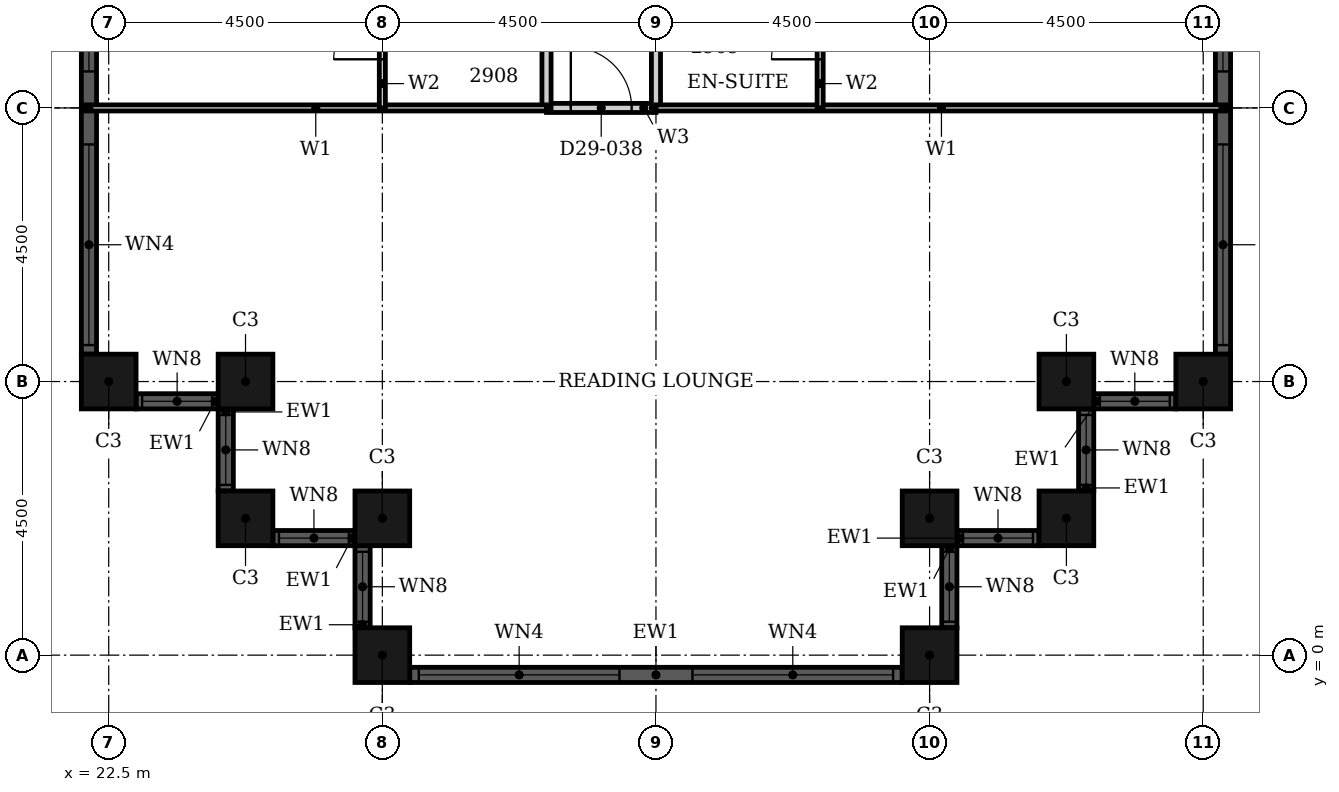
"""IFC4 building model, lengths in metres.
Left out: names, types, materials, properties, quantities, classifications, styles, units other than length and angle.
Written with IfcOpenShell. Run it as: python <this file> out.ifc"""

import sys

from ifc_helpers import new_model, si_unit, direction, frame, frame_2d, origin, origin_2d, place, context, subcontext, project, spatial, rectangle, hollow_rectangle, extrude, element, fill, save


model = new_model("IFC4")
c1 = context("Model", 3, precision=1e-05, world=origin(), true_north=direction((0.0, 1.0)))
c2 = subcontext(c1, "Body", "Model", "MODEL_VIEW")
j1 = project(units=[si_unit("LENGTHUNIT", "METRE"), si_unit("PLANEANGLEUNIT", "RADIAN")], contexts=[c1])
p1 = place(None, origin())
s1 = spatial("IfcSite", under=j1, at=p1, CompositionType="ELEMENT")
p2 = place(p1, origin())
s2 = spatial("IfcBuilding", under=s1, at=p2, CompositionType="ELEMENT")
p3 = place(p2, frame((0.0, 0.0, 118.8)))
s3 = spatial("IfcBuildingStorey", under=s2, at=p3, CompositionType="ELEMENT", Elevation=118.8)
for number, where, z_axis, x_axis in (
    (1, (22.5, 4.5, 0.0), (0.0, 0.0, 1.0), (1.0, 0.0, 0.0)),
    (2, (24.75, 4.5, 0.0), (0.0, 0.0, 1.0), (1.0, 0.0, 0.0)),
    (3, (24.75, 2.25, 0.0), (0.0, 0.0, 1.0), (1.0, 0.0, 0.0)),
    (4, (27.0, 2.25, 0.0), (0.0, 0.0, 1.0), (1.0, 0.0, 0.0)),
    (5, (27.0, 0.0, 0.0), (0.0, 0.0, 1.0), (1.0, 0.0, 0.0)),
    (6, (36.0, 0.0, 0.0), (0.0, 0.0, 1.0), (1.0, 0.0, 0.0)),
    (7, (36.0, 2.25, 0.0), (0.0, 0.0, 1.0), (1.0, 0.0, 0.0)),
    (8, (38.25, 2.25, 0.0), (0.0, 0.0, 1.0), (1.0, 0.0, 0.0)),
    (9, (38.25, 4.5, 0.0), (0.0, 0.0, 1.0), (1.0, 0.0, 0.0)),
    (10, (40.5, 4.5, 0.0), (0.0, 0.0, 1.0), (1.0, 0.0, 0.0)),
):
    element("IfcColumn", number, at=place(p3, frame(where, z_axis=z_axis, x_axis=x_axis)), inside=s3, PredefinedType="COLUMN", context=c2, shape_type="SweptSolid", body=[
        extrude(hollow_rectangle(XDim=0.9, YDim=0.9, WallThickness=0.028, at=origin_2d()), origin(), (0.0, 0.0, 1.0), 3.6),
    ])
p4 = place(p3, frame((22.95, 4.175, 0.0), z_axis=(0.0, 0.0, 1.0), x_axis=(1.0, 0.0, 0.0)))
e11 = element("IfcWall", 11, at=p4, inside=s3, PredefinedType="SOLIDWALL", context=c2, shape_type="SweptSolid", body=[
    extrude(rectangle(XDim=1.35, YDim=0.25, at=frame_2d((0.675, 0.0))), origin(), (0.0, 0.0, 1.0), 3.6),
])
p5 = place(p4, frame((0.1, 0.0, 0.9)))
e12 = element("IfcOpeningElement", 12, at=p5, cuts=e11, PredefinedType="OPENING", context=c2, shape_type="SweptSolid", body=[
    extrude(rectangle(XDim=1.15, YDim=2.08, at=frame_2d((0.575, 1.04))), frame((0.0, 0.135, 0.0), z_axis=(0.0, -1.0, 0.0), x_axis=(1.0, 0.0, 0.0)), (0.0, 0.0, 1.0), 0.27),
])
p6 = place(p3, frame((24.425, 4.05, 0.0), z_axis=(0.0, 0.0, 1.0), x_axis=(0.0, -1.0, 0.0)))
e13 = element("IfcWall", 13, at=p6, inside=s3, PredefinedType="SOLIDWALL", context=c2, shape_type="SweptSolid", body=[
    extrude(rectangle(XDim=1.35, YDim=0.25, at=frame_2d((0.675, 0.0))), origin(), (0.0, 0.0, 1.0), 3.6),
])
p7 = place(p6, frame((0.1, 0.0, 0.9)))
e14 = element("IfcOpeningElement", 14, at=p7, cuts=e13, PredefinedType="OPENING", context=c2, shape_type="SweptSolid", body=[
    extrude(rectangle(XDim=1.15, YDim=2.08, at=frame_2d((0.575, 1.04))), frame((0.0, 0.135, 0.0), z_axis=(0.0, -1.0, 0.0), x_axis=(1.0, 0.0, 0.0)), (0.0, 0.0, 1.0), 0.27),
])
p8 = place(p3, frame((25.2, 1.925, 0.0), z_axis=(0.0, 0.0, 1.0), x_axis=(1.0, 0.0, 0.0)))
e15 = element("IfcWall", 15, at=p8, inside=s3, PredefinedType="SOLIDWALL", context=c2, shape_type="SweptSolid", body=[
    extrude(rectangle(XDim=1.35, YDim=0.25, at=frame_2d((0.675, 0.0))), origin(), (0.0, 0.0, 1.0), 3.6),
])
p9 = place(p8, frame((0.1, 0.0, 0.9)))
e16 = element("IfcOpeningElement", 16, at=p9, cuts=e15, PredefinedType="OPENING", context=c2, shape_type="SweptSolid", body=[
    extrude(rectangle(XDim=1.15, YDim=2.08, at=frame_2d((0.575, 1.04))), frame((0.0, 0.135, 0.0), z_axis=(0.0, -1.0, 0.0), x_axis=(1.0, 0.0, 0.0)), (0.0, 0.0, 1.0), 0.27),
])
p10 = place(p3, frame((26.675, 1.8, 0.0), z_axis=(0.0, 0.0, 1.0), x_axis=(0.0, -1.0, 0.0)))
e17 = element("IfcWall", 17, at=p10, inside=s3, PredefinedType="SOLIDWALL", context=c2, shape_type="SweptSolid", body=[
    extrude(rectangle(XDim=1.35, YDim=0.25, at=frame_2d((0.675, 0.0))), origin(), (0.0, 0.0, 1.0), 3.6),
])
p11 = place(p10, frame((0.1, 0.0, 0.9)))
e18 = element("IfcOpeningElement", 18, at=p11, cuts=e17, PredefinedType="OPENING", context=c2, shape_type="SweptSolid", body=[
    extrude(rectangle(XDim=1.15, YDim=2.08, at=frame_2d((0.575, 1.04))), frame((0.0, 0.135, 0.0), z_axis=(0.0, -1.0, 0.0), x_axis=(1.0, 0.0, 0.0)), (0.0, 0.0, 1.0), 0.27),
])
p12 = place(p3, frame((27.45, -0.325, 0.0), z_axis=(0.0, 0.0, 1.0), x_axis=(1.0, 0.0, 0.0)))
e19 = element("IfcWall", 19, at=p12, inside=s3, PredefinedType="SOLIDWALL", context=c2, shape_type="SweptSolid", body=[
    extrude(rectangle(XDim=8.1, YDim=0.25, at=frame_2d((4.05, 0.0))), origin(), (0.0, 0.0, 1.0), 3.6),
])
p13 = place(p12, frame((0.15, 0.0, 0.9)))
e20 = element("IfcOpeningElement", 20, at=p13, cuts=e19, PredefinedType="OPENING", context=c2, shape_type="SweptSolid", body=[
    extrude(rectangle(XDim=3.3, YDim=2.08, at=frame_2d((1.65, 1.04))), frame((0.0, 0.135, 0.0), z_axis=(0.0, -1.0, 0.0), x_axis=(1.0, 0.0, 0.0)), (0.0, 0.0, 1.0), 0.27),
])
p14 = place(p12, frame((4.65, 0.0, 0.9)))
e21 = element("IfcOpeningElement", 21, at=p14, cuts=e19, PredefinedType="OPENING", context=c2, shape_type="SweptSolid", body=[
    extrude(rectangle(XDim=3.3, YDim=2.08, at=frame_2d((1.65, 1.04))), frame((0.0, 0.135, 0.0), z_axis=(0.0, -1.0, 0.0), x_axis=(1.0, 0.0, 0.0)), (0.0, 0.0, 1.0), 0.27),
])
p15 = place(p3, frame((36.325, 0.45, 0.0), z_axis=(0.0, 0.0, 1.0), x_axis=(0.0, 1.0, 0.0)))
e22 = element("IfcWall", 22, at=p15, inside=s3, PredefinedType="SOLIDWALL", context=c2, shape_type="SweptSolid", body=[
    extrude(rectangle(XDim=1.35, YDim=0.25, at=frame_2d((0.675, 0.0))), origin(), (0.0, 0.0, 1.0), 3.6),
])
p16 = place(p15, frame((0.1, 0.0, 0.9)))
e23 = element("IfcOpeningElement", 23, at=p16, cuts=e22, PredefinedType="OPENING", context=c2, shape_type="SweptSolid", body=[
    extrude(rectangle(XDim=1.15, YDim=2.08, at=frame_2d((0.575, 1.04))), frame((0.0, 0.135, 0.0), z_axis=(0.0, -1.0, 0.0), x_axis=(1.0, 0.0, 0.0)), (0.0, 0.0, 1.0), 0.27),
])
p17 = place(p3, frame((36.45, 1.925, 0.0), z_axis=(0.0, 0.0, 1.0), x_axis=(1.0, 0.0, 0.0)))
e24 = element("IfcWall", 24, at=p17, inside=s3, PredefinedType="SOLIDWALL", context=c2, shape_type="SweptSolid", body=[
    extrude(rectangle(XDim=1.35, YDim=0.25, at=frame_2d((0.675, 0.0))), origin(), (0.0, 0.0, 1.0), 3.6),
])
p18 = place(p17, frame((0.1, 0.0, 0.9)))
e25 = element("IfcOpeningElement", 25, at=p18, cuts=e24, PredefinedType="OPENING", context=c2, shape_type="SweptSolid", body=[
    extrude(rectangle(XDim=1.15, YDim=2.08, at=frame_2d((0.575, 1.04))), frame((0.0, 0.135, 0.0), z_axis=(0.0, -1.0, 0.0), x_axis=(1.0, 0.0, 0.0)), (0.0, 0.0, 1.0), 0.27),
])
p19 = place(p3, frame((38.575, 2.7, 0.0), z_axis=(0.0, 0.0, 1.0), x_axis=(0.0, 1.0, 0.0)))
e26 = element("IfcWall", 26, at=p19, inside=s3, PredefinedType="SOLIDWALL", context=c2, shape_type="SweptSolid", body=[
    extrude(rectangle(XDim=1.35, YDim=0.25, at=frame_2d((0.675, 0.0))), origin(), (0.0, 0.0, 1.0), 3.6),
])
p20 = place(p19, frame((0.1, 0.0, 0.9)))
e27 = element("IfcOpeningElement", 27, at=p20, cuts=e26, PredefinedType="OPENING", context=c2, shape_type="SweptSolid", body=[
    extrude(rectangle(XDim=1.15, YDim=2.08, at=frame_2d((0.575, 1.04))), frame((0.0, 0.135, 0.0), z_axis=(0.0, -1.0, 0.0), x_axis=(1.0, 0.0, 0.0)), (0.0, 0.0, 1.0), 0.27),
])
p21 = place(p3, frame((38.7, 4.175, 0.0), z_axis=(0.0, 0.0, 1.0), x_axis=(1.0, 0.0, 0.0)))
e28 = element("IfcWall", 28, at=p21, inside=s3, PredefinedType="SOLIDWALL", context=c2, shape_type="SweptSolid", body=[
    extrude(rectangle(XDim=1.35, YDim=0.25, at=frame_2d((0.675, 0.0))), origin(), (0.0, 0.0, 1.0), 3.6),
])
p22 = place(p21, frame((0.1, 0.0, 0.9)))
e29 = element("IfcOpeningElement", 29, at=p22, cuts=e28, PredefinedType="OPENING", context=c2, shape_type="SweptSolid", body=[
    extrude(rectangle(XDim=1.15, YDim=2.08, at=frame_2d((0.575, 1.04))), frame((0.0, 0.135, 0.0), z_axis=(0.0, -1.0, 0.0), x_axis=(1.0, 0.0, 0.0)), (0.0, 0.0, 1.0), 0.27),
])
p23 = place(p3, frame((40.825, 4.95, 0.0), z_axis=(0.0, 0.0, 1.0), x_axis=(0.0, 1.0, 0.0)))
e30 = element("IfcWall", 30, at=p23, inside=s3, PredefinedType="SOLIDWALL", context=c2, shape_type="SweptSolid", body=[
    extrude(rectangle(XDim=8.1, YDim=0.25, at=frame_2d((4.05, 0.0))), origin(), (0.0, 0.0, 1.0), 3.6),
])
p24 = place(p23, frame((0.15, 0.0, 0.9)))
e31 = element("IfcOpeningElement", 31, at=p24, cuts=e30, PredefinedType="OPENING", context=c2, shape_type="SweptSolid", body=[
    extrude(rectangle(XDim=3.3, YDim=2.08, at=frame_2d((1.65, 1.04))), frame((0.0, 0.135, 0.0), z_axis=(0.0, -1.0, 0.0), x_axis=(1.0, 0.0, 0.0)), (0.0, 0.0, 1.0), 0.27),
])
p25 = place(p23, frame((4.65, 0.0, 0.9)))
e32 = element("IfcOpeningElement", 32, at=p25, cuts=e30, PredefinedType="OPENING", context=c2, shape_type="SweptSolid", body=[
    extrude(rectangle(XDim=3.3, YDim=2.08, at=frame_2d((1.65, 1.04))), frame((0.0, 0.135, 0.0), z_axis=(0.0, -1.0, 0.0), x_axis=(1.0, 0.0, 0.0)), (0.0, 0.0, 1.0), 0.27),
])
p26 = place(p3, frame((22.175, 13.05, 0.0), z_axis=(0.0, 0.0, 1.0), x_axis=(0.0, -1.0, 0.0)))
e33 = element("IfcWall", 33, at=p26, inside=s3, PredefinedType="SOLIDWALL", context=c2, shape_type="SweptSolid", body=[
    extrude(rectangle(XDim=8.1, YDim=0.25, at=frame_2d((4.05, 0.0))), origin(), (0.0, 0.0, 1.0), 3.6),
])
p27 = place(p26, frame((0.15, 0.0, 0.9)))
e34 = element("IfcOpeningElement", 34, at=p27, cuts=e33, PredefinedType="OPENING", context=c2, shape_type="SweptSolid", body=[
    extrude(rectangle(XDim=3.3, YDim=2.08, at=frame_2d((1.65, 1.04))), frame((0.0, 0.135, 0.0), z_axis=(0.0, -1.0, 0.0), x_axis=(1.0, 0.0, 0.0)), (0.0, 0.0, 1.0), 0.27),
])
p28 = place(p26, frame((4.65, 0.0, 0.9)))
e35 = element("IfcOpeningElement", 35, at=p28, cuts=e33, PredefinedType="OPENING", context=c2, shape_type="SweptSolid", body=[
    extrude(rectangle(XDim=3.3, YDim=2.08, at=frame_2d((1.65, 1.04))), frame((0.0, 0.135, 0.0), z_axis=(0.0, -1.0, 0.0), x_axis=(1.0, 0.0, 0.0)), (0.0, 0.0, 1.0), 0.27),
])
p29 = place(p3, frame((29.7, 9.0, 0.0), z_axis=(0.0, 0.0, 1.0), x_axis=(1.0, 0.0, 0.0)))
e36 = element("IfcWall", 36, at=p29, inside=s3, PredefinedType="PARTITIONING", context=c2, shape_type="SweptSolid", body=[
    extrude(rectangle(XDim=1.8, YDim=0.15, at=frame_2d((0.9, 0.0))), origin(), (0.0, 0.0, 1.0), 3.3),
])
p30 = place(p29, frame((0.4, 0.0, 0.0)))
e37 = element("IfcOpeningElement", 37, at=p30, cuts=e36, PredefinedType="OPENING", context=c2, shape_type="SweptSolid", body=[
    extrude(rectangle(XDim=1.0, YDim=2.1, at=frame_2d((0.5, 1.05))), frame((0.0, 0.085, 0.0), z_axis=(0.0, -1.0, 0.0), x_axis=(1.0, 0.0, 0.0)), (0.0, 0.0, 1.0), 0.17),
])
p31 = place(p3, frame((29.7, 9.0, 0.0), z_axis=(0.0, 0.0, 1.0), x_axis=(0.0, 1.0, 0.0)))
e38 = element("IfcWall", 38, at=p31, inside=s3, PredefinedType="PARTITIONING", context=c2, shape_type="SweptSolid", body=[
    extrude(rectangle(XDim=11.7, YDim=0.15, at=frame_2d((5.85, 0.0))), origin(), (0.0, 0.0, 1.0), 3.3),
])
p32 = place(p31, frame((2.95, 0.0, 0.0)))
e39 = element("IfcOpeningElement", 39, at=p32, cuts=e38, PredefinedType="OPENING", context=c2, shape_type="SweptSolid", body=[
    extrude(rectangle(XDim=1.0, YDim=2.1, at=frame_2d((0.5, 1.05))), frame((0.0, 0.085, 0.0), z_axis=(0.0, -1.0, 0.0), x_axis=(1.0, 0.0, 0.0)), (0.0, 0.0, 1.0), 0.17),
])
p33 = place(p3, frame((31.5, 9.0, 0.0), z_axis=(0.0, 0.0, 1.0), x_axis=(0.0, 1.0, 0.0)))
e40 = element("IfcWall", 40, at=p33, inside=s3, PredefinedType="PARTITIONING", context=c2, shape_type="SweptSolid", body=[
    extrude(rectangle(XDim=11.7, YDim=0.15, at=frame_2d((5.85, 0.0))), origin(), (0.0, 0.0, 1.0), 2.58),
])
p34 = place(p33, frame((2.95, 0.0, 0.0)))
e41 = element("IfcOpeningElement", 41, at=p34, cuts=e40, PredefinedType="OPENING", context=c2, shape_type="SweptSolid", body=[
    extrude(rectangle(XDim=1.0, YDim=2.1, at=frame_2d((0.5, 1.05))), frame((0.0, 0.085, 0.0), z_axis=(0.0, -1.0, 0.0), x_axis=(1.0, 0.0, 0.0)), (0.0, 0.0, 1.0), 0.17),
])
p35 = place(p3, frame((31.5, 9.0, 0.0), z_axis=(0.0, 0.0, 1.0), x_axis=(1.0, 0.0, 0.0)))
e42 = element("IfcWall", 42, at=p35, inside=s3, PredefinedType="PARTITIONING", context=c2, shape_type="SweptSolid", body=[
    extrude(rectangle(XDim=9.39, YDim=0.1, at=frame_2d((4.695, 0.0))), origin(), (0.0, 0.0, 1.0), 3.3),
])
p36 = place(p3, frame((22.11, 9.0, 0.0), z_axis=(0.0, 0.0, 1.0), x_axis=(1.0, 0.0, 0.0)))
e43 = element("IfcWall", 43, at=p36, inside=s3, PredefinedType="PARTITIONING", context=c2, shape_type="SweptSolid", body=[
    extrude(rectangle(XDim=7.59, YDim=0.1, at=frame_2d((3.795, 0.0))), origin(), (0.0, 0.0, 1.0), 3.3),
])
p37 = place(p3, frame((27.0, 9.0, 0.0), z_axis=(0.0, 0.0, 1.0), x_axis=(0.0, 1.0, 0.0)))
e44 = element("IfcWall", 44, at=p37, inside=s3, PredefinedType="PARTITIONING", context=c2, shape_type="SweptSolid", body=[
    extrude(rectangle(XDim=2.4, YDim=0.1, at=frame_2d((1.2, 0.0))), origin(), (0.0, 0.0, 1.0), 2.58),
])
p38 = place(p37, frame((0.8, 0.0, 0.0)))
e45 = element("IfcOpeningElement", 45, at=p38, cuts=e44, PredefinedType="OPENING", context=c2, shape_type="SweptSolid", body=[
    extrude(rectangle(XDim=0.8, YDim=2.1, at=frame_2d((0.4, 1.05))), frame((0.0, 0.06, 0.0), z_axis=(0.0, -1.0, 0.0), x_axis=(1.0, 0.0, 0.0)), (0.0, 0.0, 1.0), 0.12),
])
p39 = place(p3, frame((34.2, 9.0, 0.0), z_axis=(0.0, 0.0, 1.0), x_axis=(0.0, 1.0, 0.0)))
e46 = element("IfcWall", 46, at=p39, inside=s3, PredefinedType="PARTITIONING", context=c2, shape_type="SweptSolid", body=[
    extrude(rectangle(XDim=2.4, YDim=0.1, at=frame_2d((1.2, 0.0))), origin(), (0.0, 0.0, 1.0), 3.3),
])
p40 = place(p39, frame((0.8, 0.0, 0.0)))
e47 = element("IfcOpeningElement", 47, at=p40, cuts=e46, PredefinedType="OPENING", context=c2, shape_type="SweptSolid", body=[
    extrude(rectangle(XDim=0.8, YDim=2.1, at=frame_2d((0.4, 1.05))), frame((0.0, 0.06, 0.0), z_axis=(0.0, -1.0, 0.0), x_axis=(1.0, 0.0, 0.0)), (0.0, 0.0, 1.0), 0.12),
])
p41 = place(p5, origin())
e48 = element("IfcWindow", 48, at=p41, inside=s3, PartitioningType="SINGLE_PANEL", PredefinedType="WINDOW", context=c2, shape_type="SweptSolid", body=[
    extrude(rectangle(XDim=1.15, YDim=2.08, at=frame_2d((0.575, 1.04))), frame((0.0, 0.03, 0.0), z_axis=(0.0, -1.0, 0.0), x_axis=(1.0, 0.0, 0.0)), (0.0, 0.0, 1.0), 0.06),
])
fill(e12, e48)
p42 = place(p7, origin())
e49 = element("IfcWindow", 49, at=p42, inside=s3, PartitioningType="SINGLE_PANEL", PredefinedType="WINDOW", context=c2, shape_type="SweptSolid", body=[
    extrude(rectangle(XDim=1.15, YDim=2.08, at=frame_2d((0.575, 1.04))), frame((0.0, 0.03, 0.0), z_axis=(0.0, -1.0, 0.0), x_axis=(1.0, 0.0, 0.0)), (0.0, 0.0, 1.0), 0.06),
])
fill(e14, e49)
p43 = place(p9, origin())
e50 = element("IfcWindow", 50, at=p43, inside=s3, PartitioningType="SINGLE_PANEL", PredefinedType="WINDOW", context=c2, shape_type="SweptSolid", body=[
    extrude(rectangle(XDim=1.15, YDim=2.08, at=frame_2d((0.575, 1.04))), frame((0.0, 0.03, 0.0), z_axis=(0.0, -1.0, 0.0), x_axis=(1.0, 0.0, 0.0)), (0.0, 0.0, 1.0), 0.06),
])
fill(e16, e50)
p44 = place(p11, origin())
e51 = element("IfcWindow", 51, at=p44, inside=s3, PartitioningType="SINGLE_PANEL", PredefinedType="WINDOW", context=c2, shape_type="SweptSolid", body=[
    extrude(rectangle(XDim=1.15, YDim=2.08, at=frame_2d((0.575, 1.04))), frame((0.0, 0.03, 0.0), z_axis=(0.0, -1.0, 0.0), x_axis=(1.0, 0.0, 0.0)), (0.0, 0.0, 1.0), 0.06),
])
fill(e18, e51)
p45 = place(p13, origin())
e52 = element("IfcWindow", 52, at=p45, inside=s3, PartitioningType="SINGLE_PANEL", PredefinedType="WINDOW", context=c2, shape_type="SweptSolid", body=[
    extrude(rectangle(XDim=3.3, YDim=2.08, at=frame_2d((1.65, 1.04))), frame((0.0, 0.03, 0.0), z_axis=(0.0, -1.0, 0.0), x_axis=(1.0, 0.0, 0.0)), (0.0, 0.0, 1.0), 0.06),
])
fill(e20, e52)
p46 = place(p14, origin())
e53 = element("IfcWindow", 53, at=p46, inside=s3, PartitioningType="SINGLE_PANEL", PredefinedType="WINDOW", context=c2, shape_type="SweptSolid", body=[
    extrude(rectangle(XDim=3.3, YDim=2.08, at=frame_2d((1.65, 1.04))), frame((0.0, 0.03, 0.0), z_axis=(0.0, -1.0, 0.0), x_axis=(1.0, 0.0, 0.0)), (0.0, 0.0, 1.0), 0.06),
])
fill(e21, e53)
p47 = place(p16, origin())
e54 = element("IfcWindow", 54, at=p47, inside=s3, PartitioningType="SINGLE_PANEL", PredefinedType="WINDOW", context=c2, shape_type="SweptSolid", body=[
    extrude(rectangle(XDim=1.15, YDim=2.08, at=frame_2d((0.575, 1.04))), frame((0.0, 0.03, 0.0), z_axis=(0.0, -1.0, 0.0), x_axis=(1.0, 0.0, 0.0)), (0.0, 0.0, 1.0), 0.06),
])
fill(e23, e54)
p48 = place(p18, origin())
e55 = element("IfcWindow", 55, at=p48, inside=s3, PartitioningType="SINGLE_PANEL", PredefinedType="WINDOW", context=c2, shape_type="SweptSolid", body=[
    extrude(rectangle(XDim=1.15, YDim=2.08, at=frame_2d((0.575, 1.04))), frame((0.0, 0.03, 0.0), z_axis=(0.0, -1.0, 0.0), x_axis=(1.0, 0.0, 0.0)), (0.0, 0.0, 1.0), 0.06),
])
fill(e25, e55)
p49 = place(p20, origin())
e56 = element("IfcWindow", 56, at=p49, inside=s3, PartitioningType="SINGLE_PANEL", PredefinedType="WINDOW", context=c2, shape_type="SweptSolid", body=[
    extrude(rectangle(XDim=1.15, YDim=2.08, at=frame_2d((0.575, 1.04))), frame((0.0, 0.03, 0.0), z_axis=(0.0, -1.0, 0.0), x_axis=(1.0, 0.0, 0.0)), (0.0, 0.0, 1.0), 0.06),
])
fill(e27, e56)
p50 = place(p22, origin())
e57 = element("IfcWindow", 57, at=p50, inside=s3, PartitioningType="SINGLE_PANEL", PredefinedType="WINDOW", context=c2, shape_type="SweptSolid", body=[
    extrude(rectangle(XDim=1.15, YDim=2.08, at=frame_2d((0.575, 1.04))), frame((0.0, 0.03, 0.0), z_axis=(0.0, -1.0, 0.0), x_axis=(1.0, 0.0, 0.0)), (0.0, 0.0, 1.0), 0.06),
])
fill(e29, e57)
p51 = place(p24, origin())
e58 = element("IfcWindow", 58, at=p51, inside=s3, PartitioningType="SINGLE_PANEL", PredefinedType="WINDOW", context=c2, shape_type="SweptSolid", body=[
    extrude(rectangle(XDim=3.3, YDim=2.08, at=frame_2d((1.65, 1.04))), frame((0.0, 0.03, 0.0), z_axis=(0.0, -1.0, 0.0), x_axis=(1.0, 0.0, 0.0)), (0.0, 0.0, 1.0), 0.06),
])
fill(e31, e58)
p52 = place(p25, origin())
e59 = element("IfcWindow", 59, at=p52, inside=s3, PartitioningType="SINGLE_PANEL", PredefinedType="WINDOW", context=c2, shape_type="SweptSolid", body=[
    extrude(rectangle(XDim=3.3, YDim=2.08, at=frame_2d((1.65, 1.04))), frame((0.0, 0.03, 0.0), z_axis=(0.0, -1.0, 0.0), x_axis=(1.0, 0.0, 0.0)), (0.0, 0.0, 1.0), 0.06),
])
fill(e32, e59)
p53 = place(p27, origin())
e60 = element("IfcWindow", 60, at=p53, inside=s3, PartitioningType="SINGLE_PANEL", PredefinedType="WINDOW", context=c2, shape_type="SweptSolid", body=[
    extrude(rectangle(XDim=3.3, YDim=2.08, at=frame_2d((1.65, 1.04))), frame((0.0, 0.03, 0.0), z_axis=(0.0, -1.0, 0.0), x_axis=(1.0, 0.0, 0.0)), (0.0, 0.0, 1.0), 0.06),
])
fill(e34, e60)
p54 = place(p28, origin())
e61 = element("IfcWindow", 61, at=p54, inside=s3, PartitioningType="SINGLE_PANEL", PredefinedType="WINDOW", context=c2, shape_type="SweptSolid", body=[
    extrude(rectangle(XDim=3.3, YDim=2.08, at=frame_2d((1.65, 1.04))), frame((0.0, 0.03, 0.0), z_axis=(0.0, -1.0, 0.0), x_axis=(1.0, 0.0, 0.0)), (0.0, 0.0, 1.0), 0.06),
])
fill(e35, e61)
p55 = place(p38, origin())
e62 = element("IfcDoor", 62, at=p55, inside=s3, OperationType="SINGLE_SWING_RIGHT", PredefinedType="DOOR", context=c2, shape_type="SweptSolid", body=[
    extrude(rectangle(XDim=0.8, YDim=2.1, at=frame_2d((0.4, 1.05))), frame((0.0, 0.025, 0.0), z_axis=(0.0, -1.0, 0.0), x_axis=(1.0, 0.0, 0.0)), (0.0, 0.0, 1.0), 0.05),
])
fill(e45, e62)
p56 = place(p40, origin())
e63 = element("IfcDoor", 63, at=p56, inside=s3, OperationType="SINGLE_SWING_RIGHT", PredefinedType="DOOR", context=c2, shape_type="SweptSolid", body=[
    extrude(rectangle(XDim=0.8, YDim=2.1, at=frame_2d((0.4, 1.05))), frame((0.0, 0.025, 0.0), z_axis=(0.0, -1.0, 0.0), x_axis=(1.0, 0.0, 0.0)), (0.0, 0.0, 1.0), 0.05),
])
fill(e47, e63)
p57 = place(p30, origin())
e64 = element("IfcDoor", 64, at=p57, inside=s3, OperationType="SINGLE_SWING_RIGHT", PredefinedType="DOOR", context=c2, shape_type="SweptSolid", body=[
    extrude(rectangle(XDim=1.0, YDim=2.1, at=frame_2d((0.5, 1.05))), frame((0.0, 0.025, 0.0), z_axis=(0.0, -1.0, 0.0), x_axis=(1.0, 0.0, 0.0)), (0.0, 0.0, 1.0), 0.05),
])
fill(e37, e64)
save(model, sys.argv[1])
